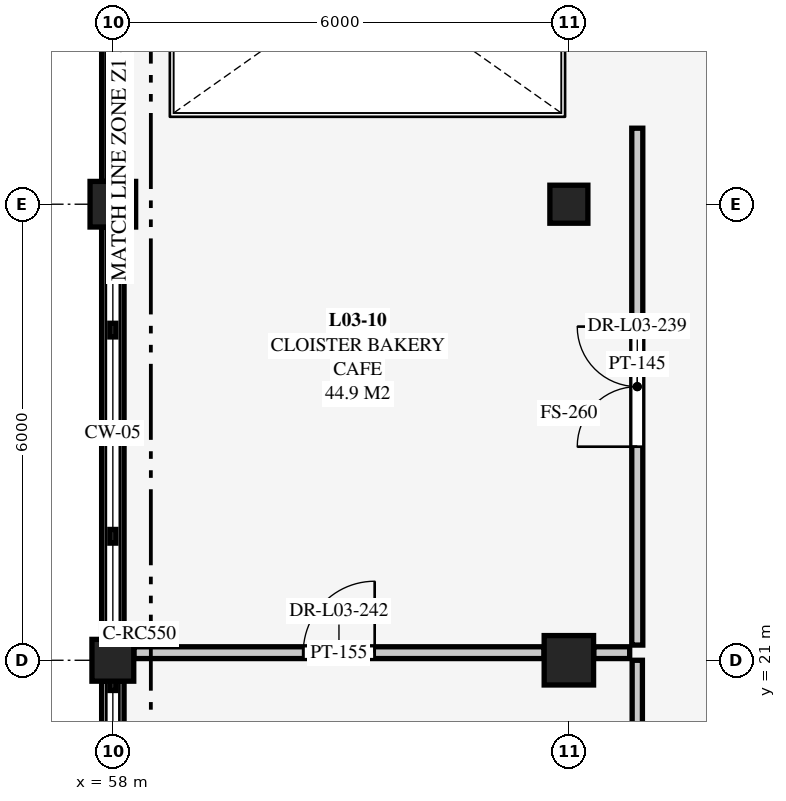
"""IFC4 building model, lengths in metres.
Left out: names, types, materials, properties, quantities, classifications, styles, units other than length and angle.
Written with IfcOpenShell. Run it as: python <this file> out.ifc"""

import sys

from ifc_helpers import new_model, si_unit, direction, frame, frame_2d, origin, origin_2d, place, context, subcontext, project, spatial, rectangle, extrude, element, fill, save


model = new_model("IFC4")
c1 = context("Model", 3, precision=1e-05, world=origin(), true_north=direction((0.0, 1.0)))
c2 = subcontext(c1, "Body", "Model", "MODEL_VIEW")
j1 = project(units=[si_unit("LENGTHUNIT", "METRE"), si_unit("PLANEANGLEUNIT", "RADIAN")], contexts=[c1])
p1 = place(None, origin())
s1 = spatial("IfcSite", under=j1, at=p1, CompositionType="ELEMENT")
p2 = place(p1, origin())
s2 = spatial("IfcBuilding", under=s1, at=p2, CompositionType="ELEMENT")
p3 = place(p2, frame((0.0, 0.0, 9.0)))
s3 = spatial("IfcBuildingStorey", under=s2, at=p3, CompositionType="ELEMENT", Elevation=9.0)
p4 = place(p3, frame((58.0, 21.0, 0.0), z_axis=(0.0, 0.0, 1.0), x_axis=(1.0, 0.0, 0.0)))
e1 = element("IfcColumn", 1, at=p4, inside=s3, PredefinedType="COLUMN", context=c2, shape_type="SweptSolid", body=[
    extrude(rectangle(XDim=0.55, YDim=0.55, at=origin_2d()), origin(), (0.0, 0.0, 1.0), 4.5),
])
p5 = place(p3, frame((58.0, 27.0, 0.0), z_axis=(0.0, 0.0, 1.0), x_axis=(1.0, 0.0, 0.0)))
e2 = element("IfcColumn", 2, at=p5, inside=s3, PredefinedType="COLUMN", context=c2, shape_type="SweptSolid", body=[
    extrude(rectangle(XDim=0.6, YDim=0.6, at=origin_2d()), origin(), (0.0, 0.0, 1.0), 4.5),
])
p6 = place(p3, frame((64.0, 21.0, 0.0), z_axis=(0.0, 0.0, 1.0), x_axis=(1.0, 0.0, 0.0)))
e3 = element("IfcColumn", 3, at=p6, inside=s3, PredefinedType="COLUMN", context=c2, shape_type="SweptSolid", body=[
    extrude(rectangle(XDim=0.65, YDim=0.65, at=origin_2d()), origin(), (0.0, 0.0, 1.0), 4.5),
])
p7 = place(p3, frame((64.0, 27.0, 0.0), z_axis=(0.0, 0.0, 1.0), x_axis=(1.0, 0.0, 0.0)))
e4 = element("IfcColumn", 4, at=p7, inside=s3, PredefinedType="COLUMN", context=c2, shape_type="SweptSolid", body=[
    extrude(rectangle(XDim=0.5, YDim=0.5, at=origin_2d()), origin(), (0.0, 0.0, 1.0), 4.5),
])
p8 = place(p3, frame((58.0, 15.25, 0.0), z_axis=(0.0, 0.0, 1.0), x_axis=(0.0, 1.0, 0.0)))
e5 = element("IfcWall", 5, at=p8, inside=s3, PredefinedType="SOLIDWALL", context=c2, shape_type="SweptSolid", body=[
    extrude(rectangle(XDim=5.475, YDim=0.295, at=frame_2d((2.738, 0.0))), origin(), (0.0, 0.0, 1.0), 0.26),
])
p9 = place(p3, frame((58.0, 21.275, 0.0), z_axis=(0.0, 0.0, 1.0), x_axis=(0.0, 1.0, 0.0)))
e6 = element("IfcWall", 6, at=p9, inside=s3, PredefinedType="SOLIDWALL", context=c2, shape_type="SweptSolid", body=[
    extrude(rectangle(XDim=5.425, YDim=0.295, at=frame_2d((2.712, 0.0))), origin(), (0.0, 0.0, 1.0), 0.36),
])
p10 = place(p3, frame((58.0, 27.3, 0.0), z_axis=(0.0, 0.0, 1.0), x_axis=(0.0, 1.0, 0.0)))
e7 = element("IfcWall", 7, at=p10, inside=s3, PredefinedType="SOLIDWALL", context=c2, shape_type="SweptSolid", body=[
    extrude(rectangle(XDim=5.375, YDim=0.295, at=frame_2d((2.688, 0.0))), origin(), (0.0, 0.0, 1.0), 0.41),
])
p11 = place(p3, frame((64.9, 9.7, 0.0), z_axis=(0.0, 0.0, 1.0), x_axis=(0.0, 1.0, 0.0)))
e8 = element("IfcWall", 8, at=p11, inside=s3, PredefinedType="PARTITIONING", context=c2, shape_type="SweptSolid", body=[
    extrude(rectangle(XDim=11.3, YDim=0.135, at=frame_2d((5.65, 0.0))), origin(), (0.0, 0.0, 1.0), 4.24),
])
p12 = place(p11, frame((6.13, 0.0, 0.0)))
e9 = element("IfcOpeningElement", 9, at=p12, cuts=e8, PredefinedType="OPENING", context=c2, shape_type="SweptSolid", body=[
    extrude(rectangle(XDim=1.54, YDim=2.26, at=frame_2d((0.77, 1.13))), frame((0.0, 0.077, 0.0), z_axis=(0.0, -1.0, 0.0), x_axis=(1.0, 0.0, 0.0)), (0.0, 0.0, 1.0), 0.155),
])
p13 = place(p3, frame((64.9, 21.2, 0.0), z_axis=(0.0, 0.0, 1.0), x_axis=(0.0, 1.0, 0.0)))
e10 = element("IfcWall", 10, at=p13, inside=s3, PredefinedType="PARTITIONING", context=c2, shape_type="SweptSolid", body=[
    extrude(rectangle(XDim=6.8, YDim=0.145, at=frame_2d((3.4, 0.0))), origin(), (0.0, 0.0, 1.0), 4.24),
])
p14 = place(p13, frame((2.61, 0.0, 0.0)))
e11 = element("IfcOpeningElement", 11, at=p14, cuts=e10, PredefinedType="OPENING", context=c2, shape_type="SweptSolid", body=[
    extrude(rectangle(XDim=1.58, YDim=2.2, at=frame_2d((0.79, 1.1))), frame((0.0, 0.083, 0.0), z_axis=(0.0, -1.0, 0.0), x_axis=(1.0, 0.0, 0.0)), (0.0, 0.0, 1.0), 0.165),
])
p15 = place(p3, frame((58.277, 21.1, 0.0), z_axis=(0.0, 0.0, 1.0), x_axis=(1.0, 0.0, 0.0)))
e12 = element("IfcWall", 12, at=p15, inside=s3, PredefinedType="PARTITIONING", context=c2, shape_type="SweptSolid", body=[
    extrude(rectangle(XDim=5.396, YDim=0.155, at=frame_2d((2.698, 0.0))), origin(), (0.0, 0.0, 1.0), 4.24),
])
p16 = place(p15, frame((2.228, 0.0, 0.0)))
e13 = element("IfcOpeningElement", 13, at=p16, cuts=e12, PredefinedType="OPENING", context=c2, shape_type="SweptSolid", body=[
    extrude(rectangle(XDim=0.94, YDim=2.1, at=frame_2d((0.47, 1.05))), frame((0.0, 0.088, 0.0), z_axis=(0.0, -1.0, 0.0), x_axis=(1.0, 0.0, 0.0)), (0.0, 0.0, 1.0), 0.175),
])
p17 = place(p3, frame((64.327, 21.1, 0.0), z_axis=(0.0, 0.0, 1.0), x_axis=(1.0, 0.0, 0.0)))
e14 = element("IfcWall", 14, at=p17, inside=s3, PredefinedType="PARTITIONING", context=c2, shape_type="SweptSolid", body=[
    extrude(rectangle(XDim=0.473, YDim=0.155, at=frame_2d((0.237, 0.0))), origin(), (0.0, 0.0, 1.0), 4.24),
])
p18 = place(p14, origin())
e15 = element("IfcDoor", 15, at=p18, inside=s3, OperationType="DOUBLE_DOOR_SINGLE_SWING", PredefinedType="DOOR", context=c2, shape_type="SweptSolid", body=[
    extrude(rectangle(XDim=1.58, YDim=2.2, at=frame_2d((0.79, 1.1))), frame((0.0, 0.025, 0.0), z_axis=(0.0, -1.0, 0.0), x_axis=(1.0, 0.0, 0.0)), (0.0, 0.0, 1.0), 0.05),
])
fill(e11, e15)
p19 = place(p16, origin())
e16 = element("IfcDoor", 16, at=p19, inside=s3, OperationType="SINGLE_SWING_RIGHT", PredefinedType="DOOR", context=c2, shape_type="SweptSolid", body=[
    extrude(rectangle(XDim=0.94, YDim=2.1, at=frame_2d((0.47, 1.05))), frame((0.0, 0.025, 0.0), z_axis=(0.0, -1.0, 0.0), x_axis=(1.0, 0.0, 0.0)), (0.0, 0.0, 1.0), 0.05),
])
fill(e13, e16)
save(model, sys.argv[1])
